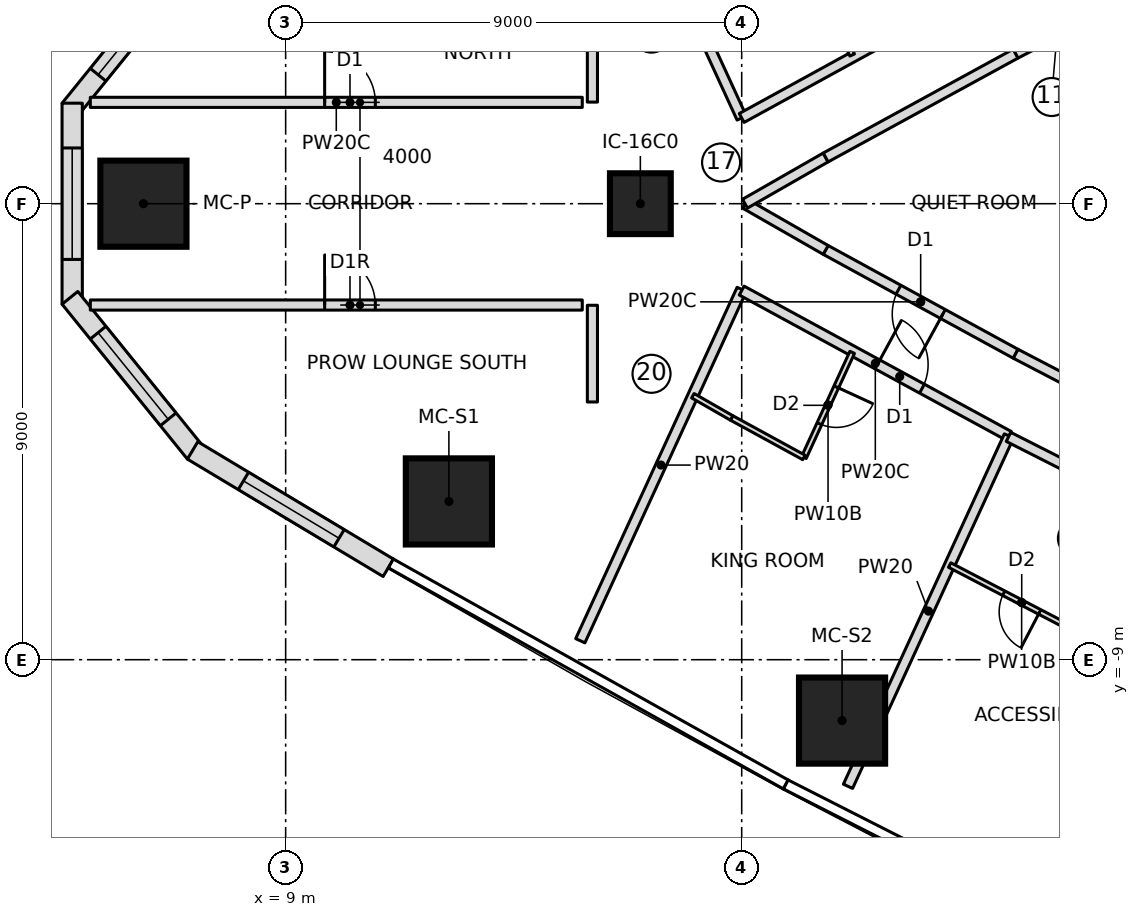
"""IFC4 building model, lengths in metres.
Left out: names, types, materials, properties, quantities, classifications, styles, units other than length and angle.
Written with IfcOpenShell. Run it as: python <this file> out.ifc"""

import sys

from ifc_helpers import new_model, si_unit, direction, frame, frame_2d, origin, origin_2d, place, context, subcontext, project, spatial, polyline, rectangle, outline, extrude, element, fill, save


model = new_model("IFC4")
c1 = context("Model", 3, precision=1e-05, world=origin(), true_north=direction((0.0, 1.0)))
c2 = subcontext(c1, "Body", "Model", "MODEL_VIEW")
j1 = project(units=[si_unit("LENGTHUNIT", "METRE"), si_unit("PLANEANGLEUNIT", "RADIAN")], contexts=[c1])
p1 = place(None, origin())
s1 = spatial("IfcSite", under=j1, at=p1, CompositionType="ELEMENT")
p2 = place(p1, origin())
s2 = spatial("IfcBuilding", under=s1, at=p2, CompositionType="ELEMENT")
p3 = place(p2, frame((0.0, 0.0, 109.75)))
s3 = spatial("IfcBuildingStorey", under=s2, at=p3, CompositionType="ELEMENT", Elevation=109.75)
for number, where, z_axis, x_axis in (
    (1, (6.193, 0.0, 0.0), (0.0, 0.0, 1.0), (1.0, 0.0, 0.0)),
    (2, (12.221, -5.876, 0.0), (0.0, 0.0, 1.0), (1.0, 0.0, 0.0)),
    (3, (19.981, -10.202, 0.0), (0.0, 0.0, 1.0), (1.0, 0.0, 0.0)),
):
    element("IfcColumn", number, at=place(p3, frame(where, z_axis=z_axis, x_axis=x_axis)), inside=s3, PredefinedType="COLUMN", context=c2, shape_type="SweptSolid", body=[
        extrude(rectangle(XDim=1.7, YDim=1.7, at=origin_2d()), origin(), (0.0, 0.0, 1.0), 3.55),
    ])
p4 = place(p3, frame((16.0, 0.0, 0.0), z_axis=(0.0, 0.0, 1.0), x_axis=(1.0, 0.0, 0.0)))
e4 = element("IfcColumn", 4, at=p4, inside=s3, PredefinedType="COLUMN", context=c2, shape_type="SweptSolid", body=[
    extrude(rectangle(XDim=1.2, YDim=1.2, at=origin_2d()), origin(), (0.0, 0.0, 1.0), 3.55),
])
p5 = place(p3, frame((7.194, 4.888, 0.0), z_axis=(0.0, 0.0, 1.0), x_axis=(-0.62903486133, -0.777377092042, 0.0)))
e5 = element("IfcWall", 5, at=p5, inside=s3, PredefinedType="NOTDEFINED", context=c2, shape_type="SweptSolid", body=[
    extrude(outline(polyline([(-0.035, -0.2), (3.897, -0.2), (3.756, 0.2), (0.035, 0.2), (-0.035, -0.2)])), origin(), (0.0, 0.0, 1.0), 3.25),
])
p6 = place(p5, frame((0.813, 0.0, 0.6)))
e6 = element("IfcOpeningElement", 6, at=p6, cuts=e5, PredefinedType="OPENING", context=c2, shape_type="SweptSolid", body=[
    extrude(outline(polyline([(0.0, 1.35), (0.084, 1.771), (0.322, 2.128), (0.679, 2.366), (1.1, 2.45), (1.521, 2.366), (1.878, 2.128), (2.116, 1.771), (2.2, 1.35), (2.2, 1.1), (2.116, 0.679), (1.878, 0.322), (1.521, 0.084), (1.1, 0.0), (0.679, 0.084), (0.322, 0.322), (0.084, 0.679), (0.0, 1.1), (0.0, 1.35)])), frame((0.0, 0.21, 0.0), z_axis=(0.0, -1.0, 0.0), x_axis=(1.0, 0.0, 0.0)), (0.0, 0.0, 1.0), 0.42),
])
p7 = place(p3, frame((4.787, 1.913, 0.0), z_axis=(0.0, 0.0, 1.0), x_axis=(0.0, -1.0, 0.0)))
e7 = element("IfcWall", 7, at=p7, inside=s3, PredefinedType="NOTDEFINED", context=c2, shape_type="SweptSolid", body=[
    extrude(outline(polyline([(-0.071, -0.2), (3.897, -0.2), (3.755, 0.2), (0.071, 0.2), (-0.071, -0.2)])), origin(), (0.0, 0.0, 1.0), 3.25),
])
p8 = place(p7, frame((0.813, 0.0, 0.6)))
e8 = element("IfcOpeningElement", 8, at=p8, cuts=e7, PredefinedType="OPENING", context=c2, shape_type="SweptSolid", body=[
    extrude(outline(polyline([(0.0, 1.35), (0.084, 1.771), (0.322, 2.128), (0.679, 2.366), (1.1, 2.45), (1.521, 2.366), (1.878, 2.128), (2.116, 1.771), (2.2, 1.35), (2.2, 1.1), (2.116, 0.679), (1.878, 0.322), (1.521, 0.084), (1.1, 0.0), (0.679, 0.084), (0.322, 0.322), (0.084, 0.679), (0.0, 1.1), (0.0, 1.35)])), frame((0.0, 0.21, 0.0), z_axis=(0.0, -1.0, 0.0), x_axis=(1.0, 0.0, 0.0)), (0.0, 0.0, 1.0), 0.42),
])
p9 = place(p3, frame((4.787, -1.913, 0.0), z_axis=(0.0, 0.0, 1.0), x_axis=(0.62903486133, -0.777377092042, 0.0)))
e9 = element("IfcWall", 9, at=p9, inside=s3, PredefinedType="NOTDEFINED", context=c2, shape_type="SweptSolid", body=[
    extrude(outline(polyline([(-0.071, -0.2), (3.862, -0.2), (3.791, 0.2), (0.071, 0.2), (-0.071, -0.2)])), origin(), (0.0, 0.0, 1.0), 3.25),
])
p10 = place(p9, frame((0.813, 0.0, 0.6)))
e10 = element("IfcOpeningElement", 10, at=p10, cuts=e9, PredefinedType="OPENING", context=c2, shape_type="SweptSolid", body=[
    extrude(outline(polyline([(0.0, 1.35), (0.084, 1.771), (0.322, 2.128), (0.679, 2.366), (1.1, 2.45), (1.521, 2.366), (1.878, 2.128), (2.116, 1.771), (2.2, 1.35), (2.2, 1.1), (2.116, 0.679), (1.878, 0.322), (1.521, 0.084), (1.1, 0.0), (0.679, 0.084), (0.322, 0.322), (0.084, 0.679), (0.0, 1.1), (0.0, 1.35)])), frame((0.0, 0.21, 0.0), z_axis=(0.0, -1.0, 0.0), x_axis=(1.0, 0.0, 0.0)), (0.0, 0.0, 1.0), 0.42),
])
p11 = place(p3, frame((7.194, -4.888, 0.0), z_axis=(0.0, 0.0, 1.0), x_axis=(0.857550776474, -0.514399325202, 0.0)))
e11 = element("IfcWall", 11, at=p11, inside=s3, PredefinedType="NOTDEFINED", context=c2, shape_type="SweptSolid", body=[
    extrude(outline(polyline([(-0.035, -0.2), (4.468, -0.2), (4.468, 0.2), (0.035, 0.2), (-0.035, -0.2)])), origin(), (0.0, 0.0, 1.0), 3.25),
])
p12 = place(p11, frame((1.134, 0.0, 0.6)))
e12 = element("IfcOpeningElement", 12, at=p12, cuts=e11, PredefinedType="OPENING", context=c2, shape_type="SweptSolid", body=[
    extrude(outline(polyline([(0.0, 1.35), (0.084, 1.771), (0.322, 2.128), (0.679, 2.366), (1.1, 2.45), (1.521, 2.366), (1.878, 2.128), (2.116, 1.771), (2.2, 1.35), (2.2, 1.1), (2.116, 0.679), (1.878, 0.322), (1.521, 0.084), (1.1, 0.0), (0.679, 0.084), (0.322, 0.322), (0.084, 0.679), (0.0, 1.1), (0.0, 1.35)])), frame((0.0, 0.21, 0.0), z_axis=(0.0, -1.0, 0.0), x_axis=(1.0, 0.0, 0.0)), (0.0, 0.0, 1.0), 0.42),
])
p13 = place(p3, frame((5.145, 2.0, 0.0), z_axis=(0.0, 0.0, 1.0), x_axis=(1.0, 0.0, 0.0)))
e13 = element("IfcWall", 13, at=p13, inside=s3, PredefinedType="PARTITIONING", context=c2, shape_type="SweptSolid", body=[
    extrude(rectangle(XDim=9.709, YDim=0.2, at=frame_2d((4.854, 0.0))), origin(), (0.0, 0.0, 1.0), 3.25),
])
p14 = place(p13, frame((4.625, 0.0, 0.0)))
e14 = element("IfcOpeningElement", 14, at=p14, cuts=e13, PredefinedType="OPENING", context=c2, shape_type="SweptSolid", body=[
    extrude(rectangle(XDim=1.0, YDim=2.1, at=frame_2d((0.5, 1.05))), frame((0.0, 0.11, 0.0), z_axis=(0.0, -1.0, 0.0), x_axis=(1.0, 0.0, 0.0)), (0.0, 0.0, 1.0), 0.22),
])
p15 = place(p3, frame((5.145, -2.0, 0.0), z_axis=(0.0, 0.0, 1.0), x_axis=(1.0, 0.0, 0.0)))
e15 = element("IfcWall", 15, at=p15, inside=s3, PredefinedType="PARTITIONING", context=c2, shape_type="SweptSolid", body=[
    extrude(rectangle(XDim=9.709, YDim=0.2, at=frame_2d((4.854, 0.0))), origin(), (0.0, 0.0, 1.0), 3.25),
])
p16 = place(p15, frame((4.625, 0.0, 0.0)))
e16 = element("IfcOpeningElement", 16, at=p16, cuts=e15, PredefinedType="OPENING", context=c2, shape_type="SweptSolid", body=[
    extrude(rectangle(XDim=1.0, YDim=2.1, at=frame_2d((0.5, 1.05))), frame((0.0, 0.11, 0.0), z_axis=(0.0, -1.0, 0.0), x_axis=(1.0, 0.0, 0.0)), (0.0, 0.0, 1.0), 0.22),
])
p17 = place(p3, frame((14.815, 8.626, 0.0), z_axis=(0.0, 0.0, 1.0), x_axis=(0.417432341259, -0.908708006166, 0.0)))
e17 = element("IfcWall", 17, at=p17, inside=s3, PredefinedType="PARTITIONING", context=c2, shape_type="SweptSolid", body=[
    extrude(rectangle(XDim=7.631, YDim=0.2, at=frame_2d((3.815, 0.0))), origin(), (0.0, 0.0, 1.0), 3.25),
])
p18 = place(p3, frame((18.0, 1.692, 0.0), z_axis=(0.0, 0.0, 1.0), x_axis=(0.876809096721, 0.480838650597, 0.0)))
e18 = element("IfcWall", 18, at=p18, inside=s3, PredefinedType="PARTITIONING", context=c2, shape_type="SweptSolid", body=[
    extrude(rectangle(XDim=6.015, YDim=0.2, at=frame_2d((3.008, 0.0))), origin(), (0.0, 0.0, 1.0), 3.25),
])
p19 = place(p18, frame((3.05, 0.0, 0.0)))
e19 = element("IfcOpeningElement", 19, at=p19, cuts=e18, PredefinedType="OPENING", context=c2, shape_type="SweptSolid", body=[
    extrude(rectangle(XDim=1.0, YDim=2.1, at=frame_2d((0.5, 1.05))), frame((0.0, 0.11, 0.0), z_axis=(0.0, -1.0, 0.0), x_axis=(1.0, 0.0, 0.0)), (0.0, 0.0, 1.0), 0.22),
])
p20 = place(p3, frame((19.228, 5.008, 0.0), z_axis=(0.0, 0.0, 1.0), x_axis=(0.417450047292, -0.908699872354, 0.0)))
e20 = element("IfcWall", 20, at=p20, inside=s3, PredefinedType="PARTITIONING", context=c2, shape_type="SweptSolid", body=[
    extrude(rectangle(XDim=2.283, YDim=0.1, at=frame_2d((1.141, 0.0))), origin(), (0.0, 0.0, 1.0), 3.25),
])
p21 = place(p20, frame((0.75, 0.0, 0.0)))
e21 = element("IfcOpeningElement", 21, at=p21, cuts=e20, PredefinedType="OPENING", context=c2, shape_type="SweptSolid", body=[
    extrude(rectangle(XDim=0.8, YDim=2.1, at=frame_2d((0.4, 1.05))), frame((0.0, 0.06, 0.0), z_axis=(0.0, -1.0, 0.0), x_axis=(1.0, 0.0, 0.0)), (0.0, 0.0, 1.0), 0.12),
])
p22 = place(p3, frame((14.815, -8.626, 0.0), z_axis=(0.0, 0.0, 1.0), x_axis=(0.417432341259, 0.908708006166, 0.0)))
e22 = element("IfcWall", 22, at=p22, inside=s3, PredefinedType="PARTITIONING", context=c2, shape_type="SweptSolid", body=[
    extrude(rectangle(XDim=7.631, YDim=0.2, at=frame_2d((3.815, 0.0))), origin(), (0.0, 0.0, 1.0), 3.25),
])
p23 = place(p3, frame((18.0, -1.715, 0.0), z_axis=(0.0, 0.0, 1.0), x_axis=(0.878415628048, -0.477897462225, 0.0)))
e23 = element("IfcWall", 23, at=p23, inside=s3, PredefinedType="PARTITIONING", context=c2, shape_type="SweptSolid", body=[
    extrude(rectangle(XDim=6.004, YDim=0.2, at=frame_2d((3.002, 0.0))), origin(), (0.0, 0.0, 1.0), 3.25),
])
p24 = place(p23, frame((3.05, 0.0, 0.0)))
e24 = element("IfcOpeningElement", 24, at=p24, cuts=e23, PredefinedType="OPENING", context=c2, shape_type="SweptSolid", body=[
    extrude(rectangle(XDim=1.0, YDim=2.1, at=frame_2d((0.5, 1.05))), frame((0.0, 0.11, 0.0), z_axis=(0.0, -1.0, 0.0), x_axis=(1.0, 0.0, 0.0)), (0.0, 0.0, 1.0), 0.22),
])
p25 = place(p3, frame((20.18, -2.934, 0.0), z_axis=(0.0, 0.0, 1.0), x_axis=(-0.417450047292, -0.908699872354, 0.0)))
e25 = element("IfcWall", 25, at=p25, inside=s3, PredefinedType="PARTITIONING", context=c2, shape_type="SweptSolid", body=[
    extrude(rectangle(XDim=2.283, YDim=0.1, at=frame_2d((1.141, 0.0))), origin(), (0.0, 0.0, 1.0), 3.25),
])
p26 = place(p25, frame((0.75, 0.0, 0.0)))
e26 = element("IfcOpeningElement", 26, at=p26, cuts=e25, PredefinedType="OPENING", context=c2, shape_type="SweptSolid", body=[
    extrude(rectangle(XDim=0.8, YDim=2.1, at=frame_2d((0.4, 1.05))), frame((0.0, 0.06, 0.0), z_axis=(0.0, -1.0, 0.0), x_axis=(1.0, 0.0, 0.0)), (0.0, 0.0, 1.0), 0.12),
])
p27 = place(p3, frame((19.228, -5.008, 0.0), z_axis=(0.0, 0.0, 1.0), x_axis=(-0.877424481957, 0.479714788663, 0.0)))
e27 = element("IfcWall", 27, at=p27, inside=s3, PredefinedType="PARTITIONING", context=c2, shape_type="SweptSolid", body=[
    extrude(rectangle(XDim=1.625, YDim=0.1, at=frame_2d((0.813, 0.0))), origin(), (0.0, 0.0, 1.0), 3.25),
])
p28 = place(p3, frame((17.801, -4.229, 0.0), z_axis=(0.0, 0.0, 1.0), x_axis=(-0.867629162742, 0.497211862248, 0.0)))
e28 = element("IfcWall", 28, at=p28, inside=s3, PredefinedType="PARTITIONING", context=c2, shape_type="SweptSolid", body=[
    extrude(rectangle(XDim=0.882, YDim=0.1, at=frame_2d((0.441, 0.0))), origin(), (0.0, 0.0, 1.0), 3.25),
])
p29 = place(p3, frame((20.098, -11.499, 0.0), z_axis=(0.0, 0.0, 1.0), x_axis=(0.417440028355, 0.908704474913, 0.0)))
e29 = element("IfcWall", 29, at=p29, inside=s3, PredefinedType="PARTITIONING", context=c2, shape_type="SweptSolid", body=[
    extrude(rectangle(XDim=7.61, YDim=0.2, at=frame_2d((3.805, 0.0))), origin(), (0.0, 0.0, 1.0), 3.25),
])
p30 = place(p3, frame((23.266, -4.602, 0.0), z_axis=(0.0, 0.0, 1.0), x_axis=(0.892007141151, -0.452021304958, 0.0)))
e30 = element("IfcWall", 30, at=p30, inside=s3, PredefinedType="PARTITIONING", context=c2, shape_type="SweptSolid", body=[
    extrude(rectangle(XDim=6.004, YDim=0.2, at=frame_2d((3.002, 0.0))), origin(), (0.0, 0.0, 1.0), 3.25),
])
p31 = place(p30, frame((3.7, 0.0, 0.0)))
e31 = element("IfcOpeningElement", 31, at=p31, cuts=e30, PredefinedType="OPENING", context=c2, shape_type="SweptSolid", body=[
    extrude(rectangle(XDim=1.0, YDim=2.1, at=frame_2d((0.5, 1.05))), frame((0.0, 0.11, 0.0), z_axis=(0.0, -1.0, 0.0), x_axis=(1.0, 0.0, 0.0)), (0.0, 0.0, 1.0), 0.22),
])
p32 = place(p3, frame((24.945, -8.612, 0.0), z_axis=(0.0, 0.0, 1.0), x_axis=(-0.886865947566, 0.46202682936, 0.0)))
e32 = element("IfcWall", 32, at=p32, inside=s3, PredefinedType="PARTITIONING", context=c2, shape_type="SweptSolid", body=[
    extrude(rectangle(XDim=3.204, YDim=0.1, at=frame_2d((1.602, 0.0))), origin(), (0.0, 0.0, 1.0), 3.25),
])
p33 = place(p32, frame((1.2, 0.0, 0.0)))
e33 = element("IfcOpeningElement", 33, at=p33, cuts=e32, PredefinedType="OPENING", context=c2, shape_type="SweptSolid", body=[
    extrude(rectangle(XDim=0.8, YDim=2.1, at=frame_2d((0.4, 1.05))), frame((0.0, 0.06, 0.0), z_axis=(0.0, -1.0, 0.0), x_axis=(1.0, 0.0, 0.0)), (0.0, 0.0, 1.0), 0.12),
])
p34 = place(p3, frame((23.407, -2.962, 0.0), z_axis=(0.0, 0.0, 1.0), x_axis=(-0.877465075585, 0.479640533242, 0.0)))
e34 = element("IfcWall", 34, at=p34, inside=s3, PredefinedType="PARTITIONING", context=c2, shape_type="SweptSolid", body=[
    extrude(rectangle(XDim=4.273, YDim=0.2, at=frame_2d((2.137, 0.0))), origin(), (0.0, 0.0, 1.0), 3.25),
])
p35 = place(p34, frame((1.636, 0.0, 0.0)))
e35 = element("IfcOpeningElement", 35, at=p35, cuts=e34, PredefinedType="OPENING", context=c2, shape_type="SweptSolid", body=[
    extrude(rectangle(XDim=1.0, YDim=2.1, at=frame_2d((0.5, 1.05))), frame((0.0, 0.11, 0.0), z_axis=(0.0, -1.0, 0.0), x_axis=(1.0, 0.0, 0.0)), (0.0, 0.0, 1.0), 0.22),
])
for number, where, z_axis, x_axis in (
    (36, (19.657, -0.912, 0.0), (0.0, 0.0, 1.0), (-0.868, 0.497, 0.0)),
    (37, (18.065, 0.0, 0.0), (0.0, 0.0, 1.0), (0.868, 0.497, 0.0)),
):
    element("IfcWall", number, at=place(p3, frame(where, z_axis=z_axis, x_axis=x_axis)), inside=s3, PredefinedType="PARTITIONING", context=c2, shape_type="SweptSolid", body=[
        extrude(rectangle(XDim=1.835, YDim=0.2, at=frame_2d((0.918, 0.0))), origin(), (0.0, 0.0, 1.0), 3.25),
    ])
p36 = place(p3, frame((19.657, 0.912, 0.0), z_axis=(0.0, 0.0, 1.0), x_axis=(0.877465075585, 0.479640533242, 0.0)))
e38 = element("IfcWall", 38, at=p36, inside=s3, PredefinedType="PARTITIONING", context=c2, shape_type="SweptSolid", body=[
    extrude(rectangle(XDim=4.273, YDim=0.2, at=frame_2d((2.137, 0.0))), origin(), (0.0, 0.0, 1.0), 3.25),
])
for number, where, z_axis, x_axis in (
    (39, (23.407, 2.962, 0.0), (0.0, 0.0, 1.0), (0.887, 0.462, 0.0)),
    (40, (26.667, -4.66, 0.0), (0.0, 0.0, 1.0), (-0.887, 0.462, 0.0)),
):
    element("IfcWall", number, at=place(p3, frame(where, z_axis=z_axis, x_axis=x_axis)), inside=s3, PredefinedType="PARTITIONING", context=c2, shape_type="SweptSolid", body=[
        extrude(rectangle(XDim=3.676, YDim=0.2, at=frame_2d((1.838, 0.0))), origin(), (0.0, 0.0, 1.0), 3.25),
    ])
p37 = place(p3, frame((15.054, 3.909, 0.0), z_axis=(0.0, 0.0, 1.0), x_axis=(0.0, -1.0, 0.0)))
e41 = element("IfcWall", 41, at=p37, inside=s3, PredefinedType="PARTITIONING", context=c2, shape_type="SweptSolid", body=[
    extrude(rectangle(XDim=1.904, YDim=0.2, at=frame_2d((0.952, 0.0))), origin(), (0.0, 0.0, 1.0), 3.25),
])
p38 = place(p3, frame((15.054, -2.005, 0.0), z_axis=(0.0, 0.0, 1.0), x_axis=(0.0, -1.0, 0.0)))
e42 = element("IfcWall", 42, at=p38, inside=s3, PredefinedType="PARTITIONING", context=c2, shape_type="SweptSolid", body=[
    extrude(rectangle(XDim=1.908, YDim=0.2, at=frame_2d((0.954, 0.0))), origin(), (0.0, 0.0, 1.0), 3.25),
])
p39 = place(p6, origin())
e43 = element("IfcWindow", 43, at=p39, inside=s3, PartitioningType="SINGLE_PANEL", PredefinedType="WINDOW", context=c2, shape_type="SweptSolid", body=[
    extrude(outline(polyline([(0.0, 1.35), (0.084, 1.771), (0.322, 2.128), (0.679, 2.366), (1.1, 2.45), (1.521, 2.366), (1.878, 2.128), (2.116, 1.771), (2.2, 1.35), (2.2, 1.1), (2.116, 0.679), (1.878, 0.322), (1.521, 0.084), (1.1, 0.0), (0.679, 0.084), (0.322, 0.322), (0.084, 0.679), (0.0, 1.1), (0.0, 1.35)])), frame((0.0, 0.17, 0.0), z_axis=(0.0, -1.0, 0.0), x_axis=(1.0, 0.0, 0.0)), (0.0, 0.0, 1.0), 0.06),
])
fill(e6, e43)
p40 = place(p8, origin())
e44 = element("IfcWindow", 44, at=p40, inside=s3, PartitioningType="SINGLE_PANEL", PredefinedType="WINDOW", context=c2, shape_type="SweptSolid", body=[
    extrude(outline(polyline([(0.0, 1.35), (0.084, 1.771), (0.322, 2.128), (0.679, 2.366), (1.1, 2.45), (1.521, 2.366), (1.878, 2.128), (2.116, 1.771), (2.2, 1.35), (2.2, 1.1), (2.116, 0.679), (1.878, 0.322), (1.521, 0.084), (1.1, 0.0), (0.679, 0.084), (0.322, 0.322), (0.084, 0.679), (0.0, 1.1), (0.0, 1.35)])), frame((0.0, 0.17, 0.0), z_axis=(0.0, -1.0, 0.0), x_axis=(1.0, 0.0, 0.0)), (0.0, 0.0, 1.0), 0.06),
])
fill(e8, e44)
p41 = place(p10, origin())
e45 = element("IfcWindow", 45, at=p41, inside=s3, PartitioningType="SINGLE_PANEL", PredefinedType="WINDOW", context=c2, shape_type="SweptSolid", body=[
    extrude(outline(polyline([(0.0, 1.35), (0.084, 1.771), (0.322, 2.128), (0.679, 2.366), (1.1, 2.45), (1.521, 2.366), (1.878, 2.128), (2.116, 1.771), (2.2, 1.35), (2.2, 1.1), (2.116, 0.679), (1.878, 0.322), (1.521, 0.084), (1.1, 0.0), (0.679, 0.084), (0.322, 0.322), (0.084, 0.679), (0.0, 1.1), (0.0, 1.35)])), frame((0.0, 0.17, 0.0), z_axis=(0.0, -1.0, 0.0), x_axis=(1.0, 0.0, 0.0)), (0.0, 0.0, 1.0), 0.06),
])
fill(e10, e45)
p42 = place(p12, origin())
e46 = element("IfcWindow", 46, at=p42, inside=s3, PartitioningType="SINGLE_PANEL", PredefinedType="WINDOW", context=c2, shape_type="SweptSolid", body=[
    extrude(outline(polyline([(0.0, 1.35), (0.084, 1.771), (0.322, 2.128), (0.679, 2.366), (1.1, 2.45), (1.521, 2.366), (1.878, 2.128), (2.116, 1.771), (2.2, 1.35), (2.2, 1.1), (2.116, 0.679), (1.878, 0.322), (1.521, 0.084), (1.1, 0.0), (0.679, 0.084), (0.322, 0.322), (0.084, 0.679), (0.0, 1.1), (0.0, 1.35)])), frame((0.0, 0.17, 0.0), z_axis=(0.0, -1.0, 0.0), x_axis=(1.0, 0.0, 0.0)), (0.0, 0.0, 1.0), 0.06),
])
fill(e12, e46)
p43 = place(p14, origin())
e47 = element("IfcDoor", 47, at=p43, inside=s3, OperationType="SINGLE_SWING_LEFT", PredefinedType="DOOR", context=c2, shape_type="SweptSolid", body=[
    extrude(rectangle(XDim=1.0, YDim=2.1, at=frame_2d((0.5, 1.05))), frame((0.0, 0.025, 0.0), z_axis=(0.0, -1.0, 0.0), x_axis=(1.0, 0.0, 0.0)), (0.0, 0.0, 1.0), 0.05),
])
fill(e14, e47)
p44 = place(p16, origin())
e48 = element("IfcDoor", 48, at=p44, inside=s3, OperationType="SINGLE_SWING_RIGHT", PredefinedType="DOOR", context=c2, shape_type="SweptSolid", body=[
    extrude(rectangle(XDim=1.0, YDim=2.1, at=frame_2d((0.5, 1.05))), frame((0.0, 0.025, 0.0), z_axis=(0.0, -1.0, 0.0), x_axis=(1.0, 0.0, 0.0)), (0.0, 0.0, 1.0), 0.05),
])
fill(e16, e48)
p45 = place(p26, origin())
e49 = element("IfcDoor", 49, at=p45, inside=s3, OperationType="SINGLE_SWING_LEFT", PredefinedType="DOOR", context=c2, shape_type="SweptSolid", body=[
    extrude(rectangle(XDim=0.8, YDim=2.1, at=frame_2d((0.4, 1.05))), frame((0.0, 0.025, 0.0), z_axis=(0.0, -1.0, 0.0), x_axis=(1.0, 0.0, 0.0)), (0.0, 0.0, 1.0), 0.05),
])
fill(e26, e49)
p46 = place(p24, origin())
e50 = element("IfcDoor", 50, at=p46, inside=s3, OperationType="SINGLE_SWING_LEFT", PredefinedType="DOOR", context=c2, shape_type="SweptSolid", body=[
    extrude(rectangle(XDim=1.0, YDim=2.1, at=frame_2d((0.5, 1.05))), frame((0.0, 0.025, 0.0), z_axis=(0.0, -1.0, 0.0), x_axis=(1.0, 0.0, 0.0)), (0.0, 0.0, 1.0), 0.05),
])
fill(e24, e50)
p47 = place(p33, origin())
e51 = element("IfcDoor", 51, at=p47, inside=s3, OperationType="SINGLE_SWING_LEFT", PredefinedType="DOOR", context=c2, shape_type="SweptSolid", body=[
    extrude(rectangle(XDim=0.8, YDim=2.1, at=frame_2d((0.4, 1.05))), frame((0.0, 0.025, 0.0), z_axis=(0.0, -1.0, 0.0), x_axis=(1.0, 0.0, 0.0)), (0.0, 0.0, 1.0), 0.05),
])
fill(e33, e51)
p48 = place(p35, origin())
e52 = element("IfcDoor", 52, at=p48, inside=s3, OperationType="SINGLE_SWING_LEFT", PredefinedType="DOOR", context=c2, shape_type="SweptSolid", body=[
    extrude(rectangle(XDim=1.0, YDim=2.1, at=frame_2d((0.5, 1.05))), frame((0.0, 0.025, 0.0), z_axis=(0.0, -1.0, 0.0), x_axis=(1.0, 0.0, 0.0)), (0.0, 0.0, 1.0), 0.05),
])
fill(e35, e52)
save(model, sys.argv[1])
